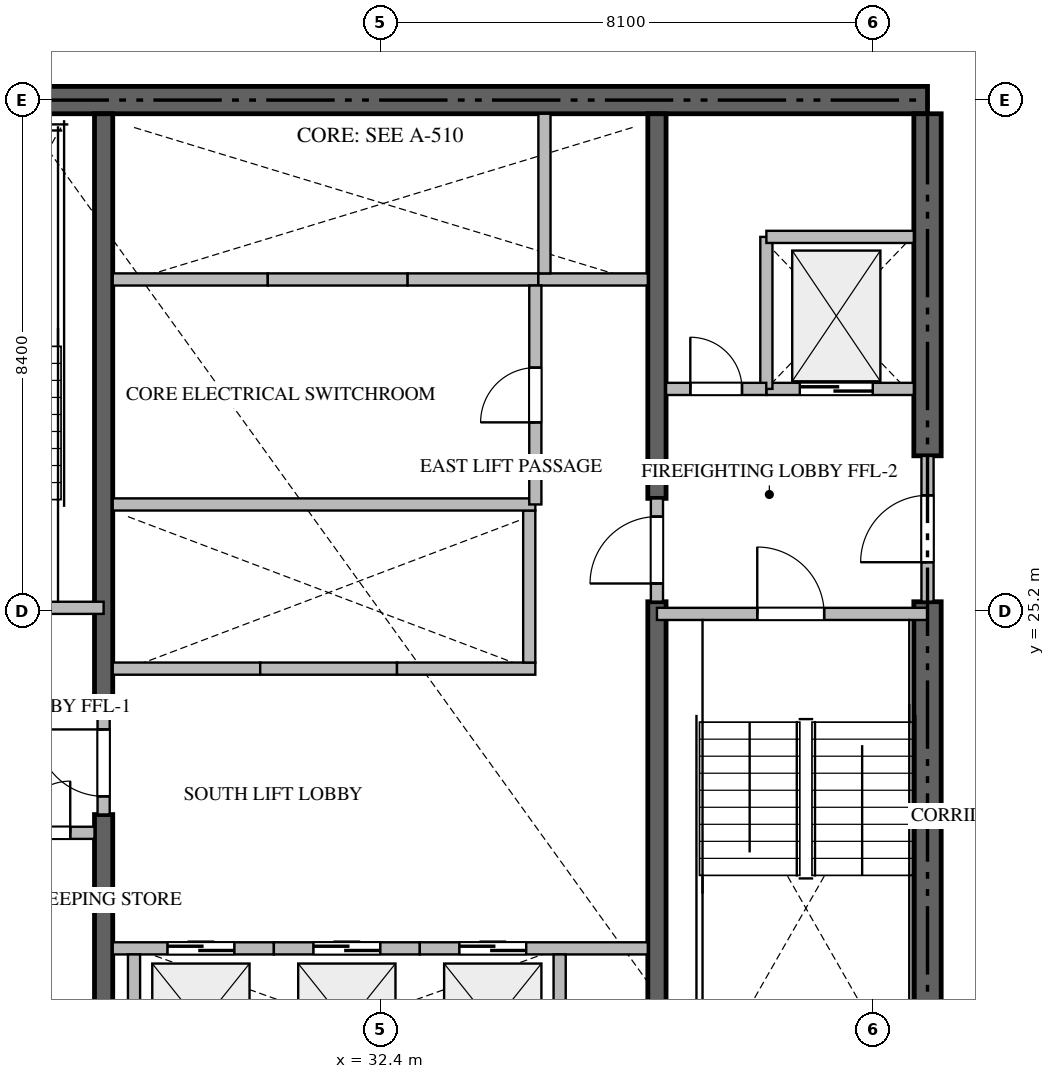
"""IFC4 building model, lengths in metres.
Left out: names, types, materials, properties, quantities, classifications, styles, units other than length and angle.
Written with IfcOpenShell. Run it as: python <this file> out.ifc"""

import sys

from ifc_helpers import new_model, si_unit, direction, frame, frame_2d, origin, place, context, subcontext, project, spatial, rectangle, extrude, source, transform, mapped, element, fill, save


model = new_model("IFC4")
c1 = context("Model", 3, precision=1e-05, world=origin(), true_north=direction((0.0, 1.0)))
c2 = subcontext(c1, "Body", "Model", "MODEL_VIEW")
j1 = project(units=[si_unit("LENGTHUNIT", "METRE"), si_unit("PLANEANGLEUNIT", "RADIAN")], contexts=[c1])
p1 = place(None, origin())
s1 = spatial("IfcSite", under=j1, at=p1, CompositionType="ELEMENT")
p2 = place(p1, origin())
s2 = spatial("IfcBuilding", under=s1, at=p2, CompositionType="ELEMENT")
p3 = place(p2, frame((0.0, 0.0, 105.45)))
s3 = spatial("IfcBuildingStorey", under=s2, at=p3, CompositionType="ELEMENT", Elevation=105.45)
p4 = place(p3, frame((41.4, 33.6, -0.26), z_axis=(0.0, 0.0, 1.0), x_axis=(-1.0, 0.0, 0.0)))
e1 = element("IfcWall", 1, at=p4, inside=s3, PredefinedType="SHEAR", context=c2, shape_type="SweptSolid", body=[
    extrude(rectangle(XDim=18.0, YDim=0.45, at=frame_2d((9.0, 0.0))), origin(), (0.0, 0.0, 1.0), 3.648),
])
p5 = place(p3, frame((41.4, 17.025, -0.26), z_axis=(0.0, 0.0, 1.0), x_axis=(0.0, 1.0, 0.0)))
e2 = element("IfcWall", 2, at=p5, inside=s3, PredefinedType="SHEAR", context=c2, shape_type="SweptSolid", body=[
    extrude(rectangle(XDim=8.325, YDim=0.45, at=frame_2d((4.163, 0.0))), origin(), (0.0, 0.0, 1.0), 3.648),
])
p6 = place(p3, frame((41.4, 27.75, -0.26), z_axis=(0.0, 0.0, 1.0), x_axis=(0.0, 1.0, 0.0)))
e3 = element("IfcWall", 3, at=p6, inside=s3, PredefinedType="SHEAR", context=c2, shape_type="SweptSolid", body=[
    extrude(rectangle(XDim=5.625, YDim=0.45, at=frame_2d((2.812, 0.0))), origin(), (0.0, 0.0, 1.0), 3.648),
])
p7 = place(p3, frame((27.85, 17.025, -0.26), z_axis=(0.0, 0.0, 1.0), x_axis=(0.0, 1.0, 0.0)))
e4 = element("IfcWall", 4, at=p7, inside=s3, PredefinedType="SHEAR", context=c2, shape_type="SweptSolid", body=[
    extrude(rectangle(XDim=4.825, YDim=0.3, at=frame_2d((2.413, 0.0))), origin(), (0.0, 0.0, 1.0), 3.648),
])
p8 = place(p3, frame((27.85, 23.55, -0.26), z_axis=(0.0, 0.0, 1.0), x_axis=(0.0, 1.0, 0.0)))
e5 = element("IfcWall", 5, at=p8, inside=s3, PredefinedType="SHEAR", context=c2, shape_type="SweptSolid", body=[
    extrude(rectangle(XDim=9.825, YDim=0.3, at=frame_2d((4.913, 0.0))), origin(), (0.0, 0.0, 1.0), 3.648),
])
p9 = place(p3, frame((36.95, 17.025, -0.26), z_axis=(0.0, 0.0, 1.0), x_axis=(0.0, 1.0, 0.0)))
e6 = element("IfcWall", 6, at=p9, inside=s3, PredefinedType="SHEAR", context=c2, shape_type="SweptSolid", body=[
    extrude(rectangle(XDim=8.325, YDim=0.3, at=frame_2d((4.163, 0.0))), origin(), (0.0, 0.0, 1.0), 3.648),
])
p10 = place(p3, frame((36.95, 27.05, -0.26), z_axis=(0.0, 0.0, 1.0), x_axis=(0.0, 1.0, 0.0)))
e7 = element("IfcWall", 7, at=p10, inside=s3, PredefinedType="SHEAR", context=c2, shape_type="SweptSolid", body=[
    extrude(rectangle(XDim=6.325, YDim=0.3, at=frame_2d((3.163, 0.0))), origin(), (0.0, 0.0, 1.0), 3.648),
])
p11 = place(p3, frame((23.4, 25.25, 0.0), z_axis=(0.0, 0.0, 1.0), x_axis=(1.0, 0.0, 0.0)))
e8 = element("IfcWall", 8, at=p11, inside=s3, PredefinedType="STANDARD", context=c2, shape_type="SweptSolid", body=[
    extrude(rectangle(XDim=4.45, YDim=0.2, at=frame_2d((2.225, 0.0))), origin(), (0.0, 0.0, 1.0), 3.39),
])
p12 = place(p11, frame((1.65, 0.0, 0.0)))
e9 = element("IfcOpeningElement", 9, at=p12, cuts=e8, PredefinedType="OPENING", context=c2, shape_type="SweptSolid", body=[
    extrude(rectangle(XDim=1.1, YDim=2.15, at=frame_2d((0.55, 1.075))), frame((0.0, 0.11, 0.0), z_axis=(0.0, -1.0, 0.0), x_axis=(1.0, 0.0, 0.0)), (0.0, 0.0, 1.0), 0.22),
])
p13 = place(p3, frame((36.95, 25.15, 0.0), z_axis=(0.0, 0.0, 1.0), x_axis=(1.0, 0.0, 0.0)))
e10 = element("IfcWall", 10, at=p13, inside=s3, PredefinedType="STANDARD", context=c2, shape_type="SweptSolid", body=[
    extrude(rectangle(XDim=4.45, YDim=0.2, at=frame_2d((2.225, 0.0))), origin(), (0.0, 0.0, 1.0), 3.39),
])
p14 = place(p13, frame((1.65, 0.0, 0.0)))
e11 = element("IfcOpeningElement", 11, at=p14, cuts=e10, PredefinedType="OPENING", context=c2, shape_type="SweptSolid", body=[
    extrude(rectangle(XDim=1.1, YDim=2.15, at=frame_2d((0.55, 1.075))), frame((0.0, 0.11, 0.0), z_axis=(0.0, -1.0, 0.0), x_axis=(1.0, 0.0, 0.0)), (0.0, 0.0, 1.0), 0.22),
])
p15 = place(p3, frame((38.75, 28.85, 0.0), z_axis=(0.0, 0.0, 1.0), x_axis=(1.0, 0.0, 0.0)))
e12 = element("IfcWall", 12, at=p15, inside=s3, PredefinedType="STANDARD", context=c2, shape_type="SweptSolid", body=[
    extrude(rectangle(XDim=2.425, YDim=0.2, at=frame_2d((1.212, 0.0))), origin(), (0.0, 0.0, 1.0), 3.39),
])
p16 = place(p15, frame((0.55, 0.0, 0.0)))
e13 = element("IfcOpeningElement", 13, at=p16, cuts=e12, PredefinedType="OPENING", context=c2, shape_type="SweptSolid", body=[
    extrude(rectangle(XDim=1.2, YDim=2.2, at=frame_2d((0.6, 1.1))), frame((0.0, 0.11, 0.0), z_axis=(0.0, -1.0, 0.0), x_axis=(1.0, 0.0, 0.0)), (0.0, 0.0, 1.0), 0.22),
])
p17 = place(p3, frame((28.0, 19.65, 0.0), z_axis=(0.0, 0.0, 1.0), x_axis=(1.0, 0.0, 0.0)))
e14 = element("IfcWall", 14, at=p17, inside=s3, PredefinedType="STANDARD", context=c2, shape_type="SweptSolid", body=[
    extrude(rectangle(XDim=2.65, YDim=0.2, at=frame_2d((1.325, 0.0))), origin(), (0.0, 0.0, 1.0), 3.39),
])
p18 = place(p17, frame((0.9, 0.0, 0.0)))
e15 = element("IfcOpeningElement", 15, at=p18, cuts=e14, PredefinedType="OPENING", context=c2, shape_type="SweptSolid", body=[
    extrude(rectangle(XDim=1.1, YDim=2.2, at=frame_2d((0.55, 1.1))), frame((0.0, 0.11, 0.0), z_axis=(0.0, -1.0, 0.0), x_axis=(1.0, 0.0, 0.0)), (0.0, 0.0, 1.0), 0.22),
])
p19 = place(p3, frame((28.35, 17.025, 0.0), z_axis=(0.0, 0.0, 1.0), x_axis=(0.0, 1.0, 0.0)))
e16 = element("IfcWall", 16, at=p19, inside=s3, PredefinedType="STANDARD", context=c2, shape_type="SweptSolid", body=[
    extrude(rectangle(XDim=2.525, YDim=0.2, at=frame_2d((1.263, 0.0))), origin(), (0.0, 0.0, 1.0), 3.39),
])
p20 = place(p3, frame((30.65, 19.65, 0.0), z_axis=(0.0, 0.0, 1.0), x_axis=(1.0, 0.0, 0.0)))
e17 = element("IfcWall", 17, at=p20, inside=s3, PredefinedType="STANDARD", context=c2, shape_type="SweptSolid", body=[
    extrude(rectangle(XDim=2.4, YDim=0.2, at=frame_2d((1.2, 0.0))), origin(), (0.0, 0.0, 1.0), 3.39),
])
p21 = place(p20, frame((0.65, 0.0, 0.0)))
e18 = element("IfcOpeningElement", 18, at=p21, cuts=e17, PredefinedType="OPENING", context=c2, shape_type="SweptSolid", body=[
    extrude(rectangle(XDim=1.1, YDim=2.2, at=frame_2d((0.55, 1.1))), frame((0.0, 0.11, 0.0), z_axis=(0.0, -1.0, 0.0), x_axis=(1.0, 0.0, 0.0)), (0.0, 0.0, 1.0), 0.22),
])
p22 = place(p3, frame((33.05, 19.65, 0.0), z_axis=(0.0, 0.0, 1.0), x_axis=(1.0, 0.0, 0.0)))
e19 = element("IfcWall", 19, at=p22, inside=s3, PredefinedType="STANDARD", context=c2, shape_type="SweptSolid", body=[
    extrude(rectangle(XDim=3.75, YDim=0.2, at=frame_2d((1.875, 0.0))), origin(), (0.0, 0.0, 1.0), 3.39),
])
p23 = place(p22, frame((0.65, 0.0, 0.0)))
e20 = element("IfcOpeningElement", 20, at=p23, cuts=e19, PredefinedType="OPENING", context=c2, shape_type="SweptSolid", body=[
    extrude(rectangle(XDim=1.1, YDim=2.2, at=frame_2d((0.55, 1.1))), frame((0.0, 0.11, 0.0), z_axis=(0.0, -1.0, 0.0), x_axis=(1.0, 0.0, 0.0)), (0.0, 0.0, 1.0), 0.22),
])
p24 = place(p3, frame((35.35, 17.025, 0.0), z_axis=(0.0, 0.0, 1.0), x_axis=(0.0, 1.0, 0.0)))
e21 = element("IfcWall", 21, at=p24, inside=s3, PredefinedType="STANDARD", context=c2, shape_type="SweptSolid", body=[
    extrude(rectangle(XDim=2.525, YDim=0.2, at=frame_2d((1.263, 0.0))), origin(), (0.0, 0.0, 1.0), 3.39),
])
p25 = place(p3, frame((28.0, 24.25, 0.0), z_axis=(0.0, 0.0, 1.0), x_axis=(1.0, 0.0, 0.0)))
e22 = element("IfcWall", 22, at=p25, inside=s3, PredefinedType="STANDARD", context=c2, shape_type="SweptSolid", body=[
    extrude(rectangle(XDim=2.425, YDim=0.2, at=frame_2d((1.212, 0.0))), origin(), (0.0, 0.0, 1.0), 3.39),
])
p26 = place(p3, frame((30.425, 24.25, 0.0), z_axis=(0.0, 0.0, 1.0), x_axis=(1.0, 0.0, 0.0)))
e23 = element("IfcWall", 23, at=p26, inside=s3, PredefinedType="STANDARD", context=c2, shape_type="SweptSolid", body=[
    extrude(rectangle(XDim=2.25, YDim=0.2, at=frame_2d((1.125, 0.0))), origin(), (0.0, 0.0, 1.0), 3.39),
])
p27 = place(p3, frame((32.675, 24.25, 0.0), z_axis=(0.0, 0.0, 1.0), x_axis=(1.0, 0.0, 0.0)))
e24 = element("IfcWall", 24, at=p27, inside=s3, PredefinedType="STANDARD", context=c2, shape_type="SweptSolid", body=[
    extrude(rectangle(XDim=2.275, YDim=0.2, at=frame_2d((1.137, 0.0))), origin(), (0.0, 0.0, 1.0), 3.39),
])
p28 = place(p3, frame((34.85, 24.35, 0.0), z_axis=(0.0, 0.0, 1.0), x_axis=(0.0, 1.0, 0.0)))
e25 = element("IfcWall", 25, at=p28, inside=s3, PredefinedType="STANDARD", context=c2, shape_type="SweptSolid", body=[
    extrude(rectangle(XDim=2.5, YDim=0.2, at=frame_2d((1.25, 0.0))), origin(), (0.0, 0.0, 1.0), 3.39),
])
p29 = place(p3, frame((28.0, 30.65, 0.0), z_axis=(0.0, 0.0, 1.0), x_axis=(1.0, 0.0, 0.0)))
e26 = element("IfcWall", 26, at=p29, inside=s3, PredefinedType="STANDARD", context=c2, shape_type="SweptSolid", body=[
    extrude(rectangle(XDim=2.55, YDim=0.2, at=frame_2d((1.275, 0.0))), origin(), (0.0, 0.0, 1.0), 3.39),
])
p30 = place(p3, frame((30.55, 30.65, 0.0), z_axis=(0.0, 0.0, 1.0), x_axis=(1.0, 0.0, 0.0)))
e27 = element("IfcWall", 27, at=p30, inside=s3, PredefinedType="STANDARD", context=c2, shape_type="SweptSolid", body=[
    extrude(rectangle(XDim=2.3, YDim=0.2, at=frame_2d((1.15, 0.0))), origin(), (0.0, 0.0, 1.0), 3.39),
])
p31 = place(p3, frame((32.85, 30.65, 0.0), z_axis=(0.0, 0.0, 1.0), x_axis=(1.0, 0.0, 0.0)))
e28 = element("IfcWall", 28, at=p31, inside=s3, PredefinedType="STANDARD", context=c2, shape_type="SweptSolid", body=[
    extrude(rectangle(XDim=2.15, YDim=0.2, at=frame_2d((1.075, 0.0))), origin(), (0.0, 0.0, 1.0), 3.39),
])
p32 = place(p3, frame((35.0, 30.65, 0.0), z_axis=(0.0, 0.0, 1.0), x_axis=(1.0, 0.0, 0.0)))
e29 = element("IfcWall", 29, at=p32, inside=s3, PredefinedType="STANDARD", context=c2, shape_type="SweptSolid", body=[
    extrude(rectangle(XDim=1.8, YDim=0.2, at=frame_2d((0.9, 0.0))), origin(), (0.0, 0.0, 1.0), 3.39),
])
p33 = place(p3, frame((35.1, 30.75, 0.0), z_axis=(0.0, 0.0, 1.0), x_axis=(0.0, 1.0, 0.0)))
e30 = element("IfcWall", 30, at=p33, inside=s3, PredefinedType="STANDARD", context=c2, shape_type="SweptSolid", body=[
    extrude(rectangle(XDim=2.625, YDim=0.2, at=frame_2d((1.312, 0.0))), origin(), (0.0, 0.0, 1.0), 3.39),
])
p34 = place(p3, frame((26.052, 21.55, 0.0), z_axis=(0.0, 0.0, 1.0), x_axis=(1.0, 0.0, 0.0)))
e31 = element("IfcWall", 31, at=p34, inside=s3, PredefinedType="STANDARD", context=c2, shape_type="SweptSolid", body=[
    extrude(rectangle(XDim=1.648, YDim=0.2, at=frame_2d((0.824, 0.0))), origin(), (0.0, 0.0, 1.0), 3.39),
])
p35 = place(p34, frame((0.399, 0.0, 0.0)))
e32 = element("IfcOpeningElement", 32, at=p35, cuts=e31, PredefinedType="OPENING", context=c2, shape_type="SweptSolid", body=[
    extrude(rectangle(XDim=0.85, YDim=2.1, at=frame_2d((0.425, 1.05))), frame((0.0, 0.11, 0.0), z_axis=(0.0, -1.0, 0.0), x_axis=(1.0, 0.0, 0.0)), (0.0, 0.0, 1.0), 0.22),
])
p36 = place(p3, frame((38.75, 28.85, 0.0), z_axis=(0.0, 0.0, 1.0), x_axis=(0.0, 1.0, 0.0)))
e33 = element("IfcWall", 33, at=p36, inside=s3, PredefinedType="STANDARD", context=c2, shape_type="SweptSolid", body=[
    extrude(rectangle(XDim=2.5, YDim=0.2, at=frame_2d((1.25, 0.0))), origin(), (0.0, 0.0, 1.0), 3.39),
])
p37 = place(p3, frame((38.75, 31.35, 0.0), z_axis=(0.0, 0.0, 1.0), x_axis=(1.0, 0.0, 0.0)))
e34 = element("IfcWall", 34, at=p37, inside=s3, PredefinedType="STANDARD", context=c2, shape_type="SweptSolid", body=[
    extrude(rectangle(XDim=2.425, YDim=0.2, at=frame_2d((1.212, 0.0))), origin(), (0.0, 0.0, 1.0), 3.39),
])
p38 = place(p3, frame((37.1, 28.85, 0.0), z_axis=(0.0, 0.0, 1.0), x_axis=(1.0, 0.0, 0.0)))
e35 = element("IfcWall", 35, at=p38, inside=s3, PredefinedType="STANDARD", context=c2, shape_type="SweptSolid", body=[
    extrude(rectangle(XDim=1.648, YDim=0.2, at=frame_2d((0.824, 0.0))), origin(), (0.0, 0.0, 1.0), 3.39),
])
p39 = place(p38, frame((0.399, 0.0, 0.0)))
e36 = element("IfcOpeningElement", 36, at=p39, cuts=e35, PredefinedType="OPENING", context=c2, shape_type="SweptSolid", body=[
    extrude(rectangle(XDim=0.85, YDim=2.1, at=frame_2d((0.425, 1.05))), frame((0.0, 0.11, 0.0), z_axis=(0.0, -1.0, 0.0), x_axis=(1.0, 0.0, 0.0)), (0.0, 0.0, 1.0), 0.22),
])
p40 = place(p3, frame((41.4, 25.352, 0.0), z_axis=(0.0, 0.0, 1.0), x_axis=(0.0, 1.0, 0.0)))
e37 = element("IfcWall", 37, at=p40, inside=s3, PredefinedType="STANDARD", context=c2, shape_type="SweptSolid", body=[
    extrude(rectangle(XDim=2.396, YDim=0.2, at=frame_2d((1.198, 0.0))), origin(), (0.0, 0.0, 1.0), 3.39),
])
p41 = place(p40, frame((0.648, 0.0, 0.0)))
e38 = element("IfcOpeningElement", 38, at=p41, cuts=e37, PredefinedType="OPENING", context=c2, shape_type="SweptSolid", body=[
    extrude(rectangle(XDim=1.1, YDim=2.15, at=frame_2d((0.55, 1.075))), frame((0.0, 0.11, 0.0), z_axis=(0.0, -1.0, 0.0), x_axis=(1.0, 0.0, 0.0)), (0.0, 0.0, 1.0), 0.22),
])
p42 = place(p3, frame((27.85, 21.852, 0.0), z_axis=(0.0, 0.0, 1.0), x_axis=(0.0, 1.0, 0.0)))
e39 = element("IfcWall", 39, at=p42, inside=s3, PredefinedType="STANDARD", context=c2, shape_type="SweptSolid", body=[
    extrude(rectangle(XDim=1.696, YDim=0.2, at=frame_2d((0.848, 0.0))), origin(), (0.0, 0.0, 1.0), 3.39),
])
p43 = place(p42, frame((0.298, 0.0, 0.0)))
e40 = element("IfcOpeningElement", 40, at=p43, cuts=e39, PredefinedType="OPENING", context=c2, shape_type="SweptSolid", body=[
    extrude(rectangle(XDim=1.1, YDim=2.15, at=frame_2d((0.55, 1.075))), frame((0.0, 0.11, 0.0), z_axis=(0.0, -1.0, 0.0), x_axis=(1.0, 0.0, 0.0)), (0.0, 0.0, 1.0), 0.22),
])
p44 = place(p3, frame((36.95, 25.352, 0.0), z_axis=(0.0, 0.0, 1.0), x_axis=(0.0, 1.0, 0.0)))
e41 = element("IfcWall", 41, at=p44, inside=s3, PredefinedType="STANDARD", context=c2, shape_type="SweptSolid", body=[
    extrude(rectangle(XDim=1.696, YDim=0.2, at=frame_2d((0.848, 0.0))), origin(), (0.0, 0.0, 1.0), 3.39),
])
p45 = place(p44, frame((0.298, 0.0, 0.0)))
e42 = element("IfcOpeningElement", 42, at=p45, cuts=e41, PredefinedType="OPENING", context=c2, shape_type="SweptSolid", body=[
    extrude(rectangle(XDim=1.1, YDim=2.15, at=frame_2d((0.55, 1.075))), frame((0.0, 0.11, 0.0), z_axis=(0.0, -1.0, 0.0), x_axis=(1.0, 0.0, 0.0)), (0.0, 0.0, 1.0), 0.22),
])
p46 = place(p3, frame((28.0, 26.95, 0.0), z_axis=(0.0, 0.0, 1.0), x_axis=(1.0, 0.0, 0.0)))
e43 = element("IfcWall", 43, at=p46, inside=s3, PredefinedType="STANDARD", context=c2, shape_type="SweptSolid", body=[
    extrude(rectangle(XDim=6.95, YDim=0.2, at=frame_2d((3.475, 0.0))), origin(), (0.0, 0.0, 1.0), 3.39),
])
p47 = place(p3, frame((34.95, 26.95, 0.0), z_axis=(0.0, 0.0, 1.0), x_axis=(0.0, 1.0, 0.0)))
e44 = element("IfcWall", 44, at=p47, inside=s3, PredefinedType="STANDARD", context=c2, shape_type="SweptSolid", body=[
    extrude(rectangle(XDim=3.6, YDim=0.2, at=frame_2d((1.8, 0.0))), origin(), (0.0, 0.0, 1.0), 3.39),
])
p48 = place(p47, frame((1.35, 0.0, 0.0)))
e45 = element("IfcOpeningElement", 45, at=p48, cuts=e44, PredefinedType="OPENING", context=c2, shape_type="SweptSolid", body=[
    extrude(rectangle(XDim=0.9, YDim=2.1, at=frame_2d((0.45, 1.05))), frame((0.0, 0.11, 0.0), z_axis=(0.0, -1.0, 0.0), x_axis=(1.0, 0.0, 0.0)), (0.0, 0.0, 1.0), 0.22),
])
m1 = source(origin(), c2, "Body", "SweptSolid", [
    extrude(rectangle(XDim=1.1, YDim=2.15, at=frame_2d((0.55, 1.075))), frame((0.0, 0.025, 0.0), z_axis=(0.0, -1.0, 0.0), x_axis=(1.0, 0.0, 0.0)), (0.0, 0.0, 1.0), 0.05),
])
p49 = place(p14, origin())
e46 = element("IfcDoor", 46, at=p49, inside=s3, OperationType="SINGLE_SWING_LEFT", PredefinedType="DOOR", context=c2, shape_type="MappedRepresentation", body=[
    mapped(m1, transform((0.0, 0.0, 0.0), scale=1.0)),
])
fill(e11, e46)
m2 = source(origin(), c2, "Body", "SweptSolid", [
    extrude(rectangle(XDim=1.2, YDim=2.2, at=frame_2d((0.6, 1.1))), frame((0.0, 0.025, 0.0), z_axis=(0.0, -1.0, 0.0), x_axis=(1.0, 0.0, 0.0)), (0.0, 0.0, 1.0), 0.05),
])
p50 = place(p16, origin())
e47 = element("IfcDoor", 47, at=p50, inside=s3, OperationType="DOUBLE_DOOR_SLIDING", PredefinedType="DOOR", context=c2, shape_type="MappedRepresentation", body=[
    mapped(m2, transform((0.0, 0.0, 0.0), scale=1.0)),
])
fill(e13, e47)
m3 = source(origin(), c2, "Body", "SweptSolid", [
    extrude(rectangle(XDim=1.1, YDim=2.2, at=frame_2d((0.55, 1.1))), frame((0.0, 0.025, 0.0), z_axis=(0.0, -1.0, 0.0), x_axis=(1.0, 0.0, 0.0)), (0.0, 0.0, 1.0), 0.05),
])
p51 = place(p18, origin())
e48 = element("IfcDoor", 48, at=p51, inside=s3, OperationType="DOUBLE_DOOR_SLIDING", PredefinedType="DOOR", context=c2, shape_type="MappedRepresentation", body=[
    mapped(m3, transform((0.0, 0.0, 0.0), scale=1.0)),
])
fill(e15, e48)
p52 = place(p21, origin())
e49 = element("IfcDoor", 49, at=p52, inside=s3, OperationType="DOUBLE_DOOR_SLIDING", PredefinedType="DOOR", context=c2, shape_type="MappedRepresentation", body=[
    mapped(m3, transform((0.0, 0.0, 0.0), scale=1.0)),
])
fill(e18, e49)
p53 = place(p23, origin())
e50 = element("IfcDoor", 50, at=p53, inside=s3, OperationType="DOUBLE_DOOR_SLIDING", PredefinedType="DOOR", context=c2, shape_type="MappedRepresentation", body=[
    mapped(m3, transform((0.0, 0.0, 0.0), scale=1.0)),
])
fill(e20, e50)
m4 = source(origin(), c2, "Body", "SweptSolid", [
    extrude(rectangle(XDim=0.85, YDim=2.1, at=frame_2d((0.425, 1.05))), frame((0.0, 0.025, 0.0), z_axis=(0.0, -1.0, 0.0), x_axis=(1.0, 0.0, 0.0)), (0.0, 0.0, 1.0), 0.05),
])
p54 = place(p35, origin())
e51 = element("IfcDoor", 51, at=p54, inside=s3, OperationType="SINGLE_SWING_RIGHT", PredefinedType="DOOR", context=c2, shape_type="MappedRepresentation", body=[
    mapped(m4, transform((0.0, 0.0, 0.0), scale=1.0)),
])
fill(e32, e51)
p55 = place(p39, origin())
e52 = element("IfcDoor", 52, at=p55, inside=s3, OperationType="SINGLE_SWING_LEFT", PredefinedType="DOOR", context=c2, shape_type="MappedRepresentation", body=[
    mapped(m4, transform((0.0, 0.0, 0.0), scale=1.0)),
])
fill(e36, e52)
p56 = place(p41, origin())
e53 = element("IfcDoor", 53, at=p56, inside=s3, OperationType="SINGLE_SWING_LEFT", PredefinedType="DOOR", context=c2, shape_type="MappedRepresentation", body=[
    mapped(m1, transform((0.0, 0.0, 0.0), scale=1.0)),
])
fill(e38, e53)
p57 = place(p43, origin())
e54 = element("IfcDoor", 54, at=p57, inside=s3, OperationType="SINGLE_SWING_RIGHT", PredefinedType="DOOR", context=c2, shape_type="MappedRepresentation", body=[
    mapped(m1, transform((0.0, 0.0, 0.0), scale=1.0)),
])
fill(e40, e54)
p58 = place(p45, origin())
e55 = element("IfcDoor", 55, at=p58, inside=s3, OperationType="SINGLE_SWING_LEFT", PredefinedType="DOOR", context=c2, shape_type="MappedRepresentation", body=[
    mapped(m1, transform((0.0, 0.0, 0.0), scale=1.0)),
])
fill(e42, e55)
m5 = source(origin(), c2, "Body", "SweptSolid", [
    extrude(rectangle(XDim=0.9, YDim=2.1, at=frame_2d((0.45, 1.05))), frame((0.0, 0.025, 0.0), z_axis=(0.0, -1.0, 0.0), x_axis=(1.0, 0.0, 0.0)), (0.0, 0.0, 1.0), 0.05),
])
p59 = place(p48, origin())
e56 = element("IfcDoor", 56, at=p59, inside=s3, OperationType="SINGLE_SWING_LEFT", PredefinedType="DOOR", context=c2, shape_type="MappedRepresentation", body=[
    mapped(m5, transform((0.0, 0.0, 0.0), scale=1.0)),
])
fill(e45, e56)
save(model, sys.argv[1])
